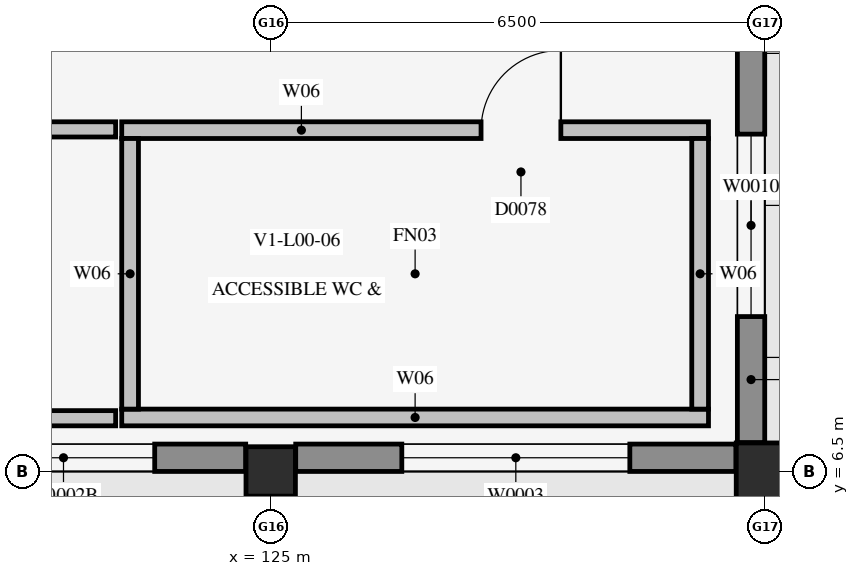
"""IFC4 building model, lengths in metres.
Left out: names, types, materials, properties, quantities, classifications, styles, units other than length and angle.
Written with IfcOpenShell. Run it as: python <this file> out.ifc"""

import sys

from ifc_helpers import new_model, si_unit, direction, frame, frame_2d, origin, origin_2d, place, context, subcontext, project, spatial, rectangle, extrude, element, fill, save


model = new_model("IFC4")
c1 = context("Model", 3, precision=1e-05, world=origin(), true_north=direction((0.0, 1.0)))
c2 = subcontext(c1, "Body", "Model", "MODEL_VIEW")
j1 = project(units=[si_unit("LENGTHUNIT", "METRE"), si_unit("PLANEANGLEUNIT", "RADIAN")], contexts=[c1])
p1 = place(None, origin())
s1 = spatial("IfcSite", under=j1, at=p1, CompositionType="ELEMENT")
p2 = place(p1, origin())
s2 = spatial("IfcBuilding", under=s1, at=p2, CompositionType="ELEMENT")
p3 = place(p2, origin())
s3 = spatial("IfcBuildingStorey", under=s2, at=p3, CompositionType="ELEMENT", Elevation=0.0)
p4 = place(p3, frame((125.0, 6.5, 0.0), z_axis=(0.0, 0.0, 1.0), x_axis=(1.0, 0.0, 0.0)))
e1 = element("IfcColumn", 1, at=p4, inside=s3, PredefinedType="COLUMN", context=c2, shape_type="SweptSolid", body=[
    extrude(rectangle(XDim=0.65, YDim=0.65, at=origin_2d()), origin(), (0.0, 0.0, 1.0), 5.4),
])
p5 = place(p3, frame((131.5, 6.5, 0.0), z_axis=(0.0, 0.0, 1.0), x_axis=(1.0, 0.0, 0.0)))
e2 = element("IfcColumn", 2, at=p5, inside=s3, PredefinedType="COLUMN", context=c2, shape_type="SweptSolid", body=[
    extrude(rectangle(XDim=0.75, YDim=0.75, at=origin_2d()), origin(), (0.0, 0.0, 1.0), 5.4),
])
p6 = place(p3, frame((115.24, 7.2, 0.0), z_axis=(0.0, 0.0, 1.0), x_axis=(1.0, 0.0, 0.0)))
e3 = element("IfcWall", 3, at=p6, inside=s3, PredefinedType="PLUMBINGWALL", context=c2, shape_type="SweptSolid", body=[
    extrude(rectangle(XDim=7.72, YDim=0.2, at=frame_2d((3.86, 0.0))), origin(), (0.0, 0.0, 1.0), 5.125),
])
p7 = place(p3, frame((115.24, 11.0, 0.0), z_axis=(0.0, 0.0, 1.0), x_axis=(1.0, 0.0, 0.0)))
e4 = element("IfcWall", 4, at=p7, inside=s3, PredefinedType="PLUMBINGWALL", context=c2, shape_type="SweptSolid", body=[
    extrude(rectangle(XDim=7.72, YDim=0.2, at=frame_2d((3.86, 0.0))), origin(), (0.0, 0.0, 1.0), 5.125),
])
p8 = place(p7, frame((4.84, 0.0, 0.0)))
e5 = element("IfcOpeningElement", 5, at=p8, cuts=e4, PredefinedType="OPENING", context=c2, shape_type="SweptSolid", body=[
    extrude(rectangle(XDim=0.9, YDim=2.1, at=frame_2d((0.45, 1.05))), frame((0.0, 0.112, 0.0), z_axis=(0.0, -1.0, 0.0), x_axis=(1.0, 0.0, 0.0)), (0.0, 0.0, 1.0), 0.224),
])
p9 = place(p3, frame((123.04, 7.21, 0.0), z_axis=(0.0, 0.0, 1.0), x_axis=(1.0, 0.0, 0.0)))
e6 = element("IfcWall", 6, at=p9, inside=s3, PredefinedType="PLUMBINGWALL", context=c2, shape_type="SweptSolid", body=[
    extrude(rectangle(XDim=7.72, YDim=0.22, at=frame_2d((3.86, 0.0))), origin(), (0.0, 0.0, 1.0), 5.125),
])
p10 = place(p3, frame((123.04, 10.99, 0.0), z_axis=(0.0, 0.0, 1.0), x_axis=(1.0, 0.0, 0.0)))
e7 = element("IfcWall", 7, at=p10, inside=s3, PredefinedType="PLUMBINGWALL", context=c2, shape_type="SweptSolid", body=[
    extrude(rectangle(XDim=7.72, YDim=0.22, at=frame_2d((3.86, 0.0))), origin(), (0.0, 0.0, 1.0), 5.125),
])
p11 = place(p10, frame((4.728, 0.0, 0.0)))
e8 = element("IfcOpeningElement", 8, at=p11, cuts=e7, PredefinedType="OPENING", context=c2, shape_type="SweptSolid", body=[
    extrude(rectangle(XDim=1.05, YDim=2.15, at=frame_2d((0.525, 1.075))), frame((0.0, 0.122, 0.0), z_axis=(0.0, -1.0, 0.0), x_axis=(1.0, 0.0, 0.0)), (0.0, 0.0, 1.0), 0.244),
])
for number, where, z_axis, x_axis in (
    (9, (130.65, 7.32, 0.0), (0.0, 0.0, 1.0), (0.0, 1.0, 0.0)),
    (10, (123.15, 7.32, 0.0), (0.0, 0.0, 1.0), (0.0, 1.0, 0.0)),
):
    element("IfcWall", number, at=place(p3, frame(where, z_axis=z_axis, x_axis=x_axis)), inside=s3, PredefinedType="PLUMBINGWALL", context=c2, shape_type="SweptSolid", body=[
        extrude(rectangle(XDim=3.56, YDim=0.22, at=frame_2d((1.78, 0.0))), origin(), (0.0, 0.0, 1.0), 5.125),
    ])
p12 = place(p3, frame((116.279, 6.68, 0.0), z_axis=(0.0, 0.0, 1.0), x_axis=(1.0, 0.0, 0.0)))
e11 = element("IfcWall", 11, at=p12, inside=s3, PredefinedType="SOLIDWALL", context=c2, shape_type="SweptSolid", body=[
    extrude(rectangle(XDim=8.392, YDim=0.36, at=frame_2d((4.196, 0.0))), origin(), (0.0, 0.0, 1.0), 4.224),
])
p13 = place(p12, frame((1.197, 0.0, 0.95)))
e12 = element("IfcOpeningElement", 12, at=p13, cuts=e11, PredefinedType="OPENING", context=c2, shape_type="SweptSolid", body=[
    extrude(rectangle(XDim=2.4, YDim=2.1, at=frame_2d((1.2, 1.05))), frame((0.0, 0.192, 0.0), z_axis=(0.0, -1.0, 0.0), x_axis=(1.0, 0.0, 0.0)), (0.0, 0.0, 1.0), 0.384),
])
p14 = place(p12, frame((4.795, 0.0, 0.95)))
e13 = element("IfcOpeningElement", 13, at=p14, cuts=e11, PredefinedType="OPENING", context=c2, shape_type="SweptSolid", body=[
    extrude(rectangle(XDim=2.4, YDim=2.1, at=frame_2d((1.2, 1.05))), frame((0.0, 0.192, 0.0), z_axis=(0.0, -1.0, 0.0), x_axis=(1.0, 0.0, 0.0)), (0.0, 0.0, 1.0), 0.384),
])
p15 = place(p3, frame((125.329, 6.68, 0.0), z_axis=(0.0, 0.0, 1.0), x_axis=(1.0, 0.0, 0.0)))
e14 = element("IfcWall", 14, at=p15, inside=s3, PredefinedType="SOLIDWALL", context=c2, shape_type="SweptSolid", body=[
    extrude(rectangle(XDim=5.792, YDim=0.36, at=frame_2d((2.896, 0.0))), origin(), (0.0, 0.0, 1.0), 4.138),
])
p16 = place(p15, frame((1.396, 0.0, 0.95)))
e15 = element("IfcOpeningElement", 15, at=p16, cuts=e14, PredefinedType="OPENING", context=c2, shape_type="SweptSolid", body=[
    extrude(rectangle(XDim=3.0, YDim=2.1, at=frame_2d((1.5, 1.05))), frame((0.0, 0.192, 0.0), z_axis=(0.0, -1.0, 0.0), x_axis=(1.0, 0.0, 0.0)), (0.0, 0.0, 1.0), 0.384),
])
p17 = place(p3, frame((131.32, 6.879, 0.0), z_axis=(0.0, 0.0, 1.0), x_axis=(0.0, 1.0, 0.0)))
e16 = element("IfcWall", 16, at=p17, inside=s3, PredefinedType="SOLIDWALL", context=c2, shape_type="SweptSolid", body=[
    extrude(rectangle(XDim=5.717, YDim=0.36, at=frame_2d((2.858, 0.0))), origin(), (0.0, 0.0, 1.0), 4.664),
])
p18 = place(p17, frame((1.658, 0.0, 0.95)))
e17 = element("IfcOpeningElement", 17, at=p18, cuts=e16, PredefinedType="OPENING", context=c2, shape_type="SweptSolid", body=[
    extrude(rectangle(XDim=2.4, YDim=1.8, at=frame_2d((1.2, 0.9))), frame((0.0, 0.192, 0.0), z_axis=(0.0, -1.0, 0.0), x_axis=(1.0, 0.0, 0.0)), (0.0, 0.0, 1.0), 0.384),
])
p19 = place(p11, frame((1.05, 0.0, 0.0), z_axis=(0.0, 0.0, 1.0), x_axis=(-1.0, 0.0, 0.0)))
e18 = element("IfcDoor", 18, at=p19, inside=s3, OperationType="SINGLE_SWING_RIGHT", PredefinedType="DOOR", context=c2, shape_type="SweptSolid", body=[
    extrude(rectangle(XDim=1.05, YDim=2.15, at=frame_2d((0.525, 1.075))), frame((0.0, 0.025, 0.0), z_axis=(0.0, -1.0, 0.0), x_axis=(1.0, 0.0, 0.0)), (0.0, 0.0, 1.0), 0.05),
])
fill(e8, e18)
p20 = place(p14, origin())
e19 = element("IfcWindow", 19, at=p20, inside=s3, PartitioningType="SINGLE_PANEL", PredefinedType="WINDOW", context=c2, shape_type="SweptSolid", body=[
    extrude(rectangle(XDim=2.4, YDim=2.1, at=frame_2d((1.2, 1.05))), frame((0.0, 0.03, 0.0), z_axis=(0.0, -1.0, 0.0), x_axis=(1.0, 0.0, 0.0)), (0.0, 0.0, 1.0), 0.06),
])
fill(e13, e19)
p21 = place(p16, origin())
e20 = element("IfcWindow", 20, at=p21, inside=s3, PartitioningType="SINGLE_PANEL", PredefinedType="WINDOW", context=c2, shape_type="SweptSolid", body=[
    extrude(rectangle(XDim=3.0, YDim=2.1, at=frame_2d((1.5, 1.05))), frame((0.0, 0.03, 0.0), z_axis=(0.0, -1.0, 0.0), x_axis=(1.0, 0.0, 0.0)), (0.0, 0.0, 1.0), 0.06),
])
fill(e15, e20)
p22 = place(p18, origin())
e21 = element("IfcWindow", 21, at=p22, inside=s3, PartitioningType="SINGLE_PANEL", PredefinedType="WINDOW", context=c2, shape_type="SweptSolid", body=[
    extrude(rectangle(XDim=2.4, YDim=1.8, at=frame_2d((1.2, 0.9))), frame((0.0, 0.03, 0.0), z_axis=(0.0, -1.0, 0.0), x_axis=(1.0, 0.0, 0.0)), (0.0, 0.0, 1.0), 0.06),
])
fill(e17, e21)
save(model, sys.argv[1])
